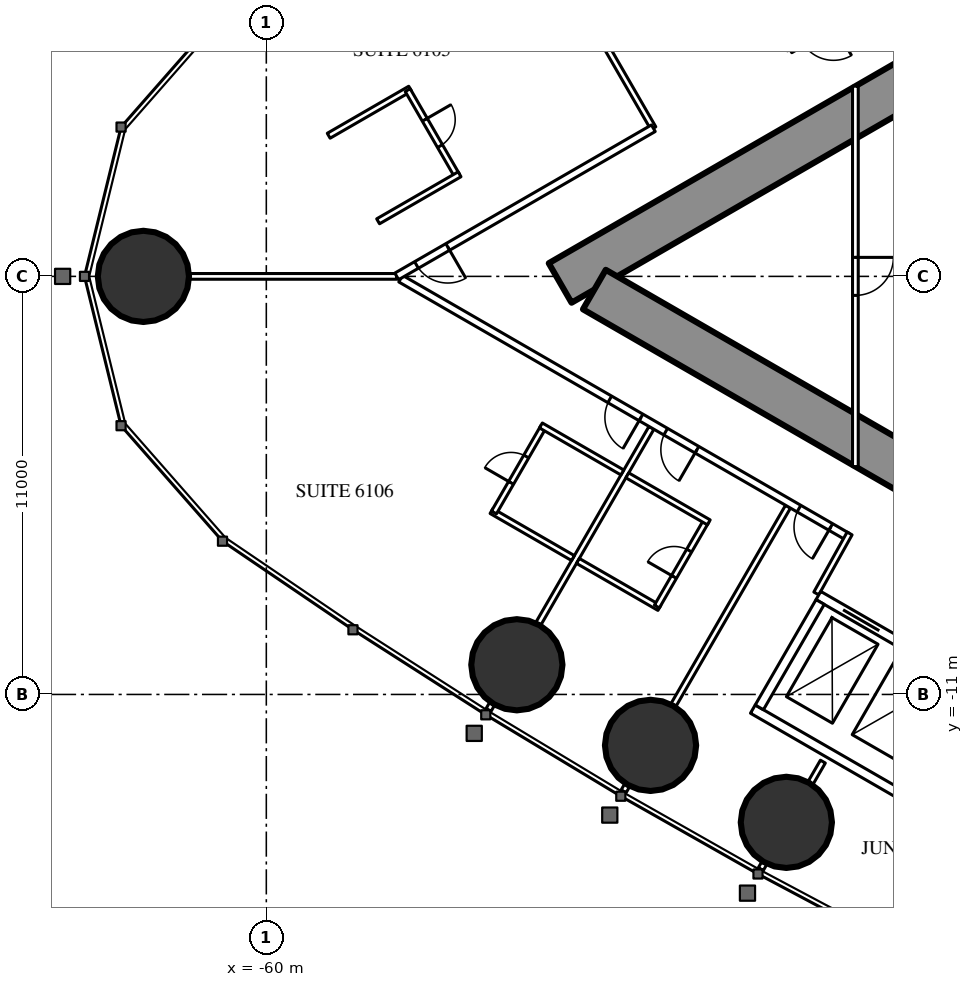
"""IFC4 building model, lengths in metres.
Left out: names, types, materials, properties, quantities, classifications, styles, units other than length and angle.
Written with IfcOpenShell. Run it as: python <this file> out.ifc"""

import sys

from ifc_helpers import new_model, si_unit, direction, frame, frame_2d, origin, origin_2d, place, context, subcontext, project, spatial, rectangle, circle, extrude, element, fill, save


model = new_model("IFC4")
c1 = context("Model", 3, precision=1e-05, world=origin(), true_north=direction((0.0, 1.0)))
c2 = subcontext(c1, "Body", "Model", "MODEL_VIEW")
j1 = project(units=[si_unit("LENGTHUNIT", "METRE"), si_unit("PLANEANGLEUNIT", "RADIAN")], contexts=[c1])
p1 = place(None, origin())
s1 = spatial("IfcSite", under=j1, at=p1, CompositionType="ELEMENT")
p2 = place(p1, origin())
s2 = spatial("IfcBuilding", under=s1, at=p2, CompositionType="ELEMENT")
p3 = place(p2, frame((0.0, 0.0, 229.7)))
s3 = spatial("IfcBuildingStorey", under=s2, at=p3, CompositionType="ELEMENT", Elevation=229.7)
for number, where, z_axis, x_axis in (
    (1, (-63.234, 0.0, 0.0), (0.0, 0.0, 1.0), (1.0, 0.0, 0.0)),
    (2, (-53.408, -10.219, 0.0), (0.0, 0.0, 1.0), (1.0, 0.0, 0.0)),
    (3, (-49.89, -12.34, 0.0), (0.0, 0.0, 1.0), (1.0, 0.0, 0.0)),
    (4, (-46.317, -14.365, 0.0), (0.0, 0.0, 1.0), (1.0, 0.0, 0.0)),
):
    element("IfcColumn", number, at=place(p3, frame(where, z_axis=z_axis, x_axis=x_axis)), inside=s3, PredefinedType="COLUMN", context=c2, shape_type="SweptSolid", body=[
        extrude(circle(Radius=1.2, at=origin_2d()), origin(), (0.0, 0.0, 1.0), 3.6),
    ])
p4 = place(p3, frame((-27.2, 14.3, 0.0), z_axis=(0.0, 0.0, 1.0), x_axis=(-0.866026593062, -0.499997940104, 0.0)))
e5 = element("IfcWall", 5, at=p4, inside=s3, PredefinedType="SHEAR", context=c2, shape_type="SweptSolid", body=[
    extrude(rectangle(XDim=28.946, YDim=1.2, at=frame_2d((14.473, 0.0))), origin(), (0.0, 0.0, 1.0), 3.6),
])
p5 = place(p4, frame((4.6, 0.0, 0.0)))
e6 = element("IfcOpeningElement", 6, at=p5, cuts=e5, PredefinedType="OPENING", context=c2, shape_type="SweptSolid", body=[
    extrude(rectangle(XDim=1.0, YDim=2.2, at=frame_2d((0.5, 1.1))), frame((0.0, 0.61, 0.0), z_axis=(0.0, -1.0, 0.0), x_axis=(1.0, 0.0, 0.0)), (0.0, 0.0, 1.0), 1.22),
])
p6 = place(p4, frame((13.395, 0.0, 0.0)))
e7 = element("IfcOpeningElement", 7, at=p6, cuts=e5, PredefinedType="OPENING", context=c2, shape_type="SweptSolid", body=[
    extrude(rectangle(XDim=1.8, YDim=2.2, at=frame_2d((0.9, 1.1))), frame((0.0, 0.61, 0.0), z_axis=(0.0, -1.0, 0.0), x_axis=(1.0, 0.0, 0.0)), (0.0, 0.0, 1.0), 1.22),
])
p7 = place(p3, frame((-27.2, -14.3, 0.0), z_axis=(0.0, 0.0, 1.0), x_axis=(-0.866024021859, 0.500002393557, 0.0)))
e8 = element("IfcWall", 8, at=p7, inside=s3, PredefinedType="SHEAR", context=c2, shape_type="SweptSolid", body=[
    extrude(rectangle(XDim=27.907, YDim=1.2, at=frame_2d((13.954, 0.0))), origin(), (0.0, 0.0, 1.0), 3.6),
])
p8 = place(p7, frame((4.6, 0.0, 0.0)))
e9 = element("IfcOpeningElement", 9, at=p8, cuts=e8, PredefinedType="OPENING", context=c2, shape_type="SweptSolid", body=[
    extrude(rectangle(XDim=1.0, YDim=2.2, at=frame_2d((0.5, 1.1))), frame((0.0, 0.61, 0.0), z_axis=(0.0, -1.0, 0.0), x_axis=(1.0, 0.0, 0.0)), (0.0, 0.0, 1.0), 1.22),
])
p9 = place(p7, frame((13.395, 0.0, 0.0)))
e10 = element("IfcOpeningElement", 10, at=p9, cuts=e8, PredefinedType="OPENING", context=c2, shape_type="SweptSolid", body=[
    extrude(rectangle(XDim=1.8, YDim=2.2, at=frame_2d((0.9, 1.1))), frame((0.0, 0.61, 0.0), z_axis=(0.0, -1.0, 0.0), x_axis=(1.0, 0.0, 0.0)), (0.0, 0.0, 1.0), 1.22),
])
p10 = place(p3, frame((-49.816, 3.898, 0.0), z_axis=(0.0, 0.0, 1.0), x_axis=(-0.500001913541, 0.866024298998, 0.0)))
e11 = element("IfcWall", 11, at=p10, inside=s3, PredefinedType="PARTITIONING", context=c2, shape_type="SweptSolid", body=[
    extrude(rectangle(XDim=6.05, YDim=0.15, at=frame_2d((3.025, 0.0))), origin(), (0.0, 0.0, 1.0), 2.45),
])
p11 = place(p3, frame((-46.898, -15.439, 0.0), z_axis=(0.0, 0.0, 1.0), x_axis=(-0.500232303069, -0.865891241997, 0.0)))
e12 = element("IfcWall", 12, at=p11, inside=s3, PredefinedType="PARTITIONING", context=c2, shape_type="SweptSolid", body=[
    extrude(rectangle(XDim=0.18, YDim=0.15, at=frame_2d((0.09, 0.0))), origin(), (0.0, 0.0, 1.0), 2.45),
])
p12 = place(p3, frame((-46.274, -6.059, 0.0), z_axis=(0.0, 0.0, 1.0), x_axis=(-0.500020471368, -0.866013584312, 0.0)))
e13 = element("IfcWall", 13, at=p12, inside=s3, PredefinedType="PARTITIONING", context=c2, shape_type="SweptSolid", body=[
    extrude(rectangle(XDim=6.028, YDim=0.15, at=frame_2d((3.014, 0.0))), origin(), (0.0, 0.0, 1.0), 2.45),
])
p13 = place(p3, frame((-50.508, -13.392, 0.0), z_axis=(0.0, 0.0, 1.0), x_axis=(-0.499644091975, -0.866230789891, 0.0)))
e14 = element("IfcWall", 14, at=p13, inside=s3, PredefinedType="PARTITIONING", context=c2, shape_type="SweptSolid", body=[
    extrude(rectangle(XDim=0.18, YDim=0.15, at=frame_2d((0.09, 0.0))), origin(), (0.0, 0.0, 1.0), 2.45),
])
p14 = place(p3, frame((-49.866, -3.985, 0.0), z_axis=(0.0, 0.0, 1.0), x_axis=(-0.500000694566, -0.866025002776, 0.0)))
e15 = element("IfcWall", 15, at=p14, inside=s3, PredefinedType="PARTITIONING", context=c2, shape_type="SweptSolid", body=[
    extrude(rectangle(XDim=5.95, YDim=0.15, at=frame_2d((2.975, 0.0))), origin(), (0.0, 0.0, 1.0), 2.45),
])
p15 = place(p3, frame((-54.061, -11.25, 0.0), z_axis=(0.0, 0.0, 1.0), x_axis=(-0.500391173478, -0.865799441849, 0.0)))
e16 = element("IfcWall", 16, at=p15, inside=s3, PredefinedType="PARTITIONING", context=c2, shape_type="SweptSolid", body=[
    extrude(rectangle(XDim=0.179, YDim=0.15, at=frame_2d((0.089, 0.0))), origin(), (0.0, 0.0, 1.0), 2.45),
])
p16 = place(p3, frame((-56.568, 0.0, 0.0), z_axis=(0.0, 0.0, 1.0), x_axis=(-1.0, 0.0, 0.0)))
e17 = element("IfcWall", 17, at=p16, inside=s3, PredefinedType="PARTITIONING", context=c2, shape_type="SweptSolid", body=[
    extrude(rectangle(XDim=5.446, YDim=0.15, at=frame_2d((2.723, 0.0))), origin(), (0.0, 0.0, 1.0), 2.45),
])
p17 = place(p3, frame((-45.356, -12.767, 0.0), z_axis=(0.0, 0.0, 1.0), x_axis=(-0.499886366516, -0.866091000168, 0.0)))
e18 = element("IfcWall", 18, at=p17, inside=s3, PredefinedType="PARTITIONING", context=c2, shape_type="SweptSolid", body=[
    extrude(rectangle(XDim=0.645, YDim=0.15, at=frame_2d((0.322, 0.0))), origin(), (0.0, 0.0, 1.0), 3.35),
])
p18 = place(p3, frame((-44.715, -6.844, 0.0), z_axis=(0.0, 0.0, 1.0), x_axis=(-0.866025261224, 0.500000246922, 0.0)))
e19 = element("IfcWall", 19, at=p18, inside=s3, PredefinedType="PARTITIONING", context=c2, shape_type="SweptSolid", body=[
    extrude(rectangle(XDim=13.567, YDim=0.2, at=frame_2d((6.783, 0.0))), origin(), (0.0, 0.0, 1.0), 3.35),
])
p19 = place(p18, frame((6.266, 0.0, 0.0)))
e20 = element("IfcOpeningElement", 20, at=p19, cuts=e19, PredefinedType="OPENING", context=c2, shape_type="SweptSolid", body=[
    extrude(rectangle(XDim=0.95, YDim=2.2, at=frame_2d((0.475, 1.1))), frame((0.0, 0.11, 0.0), z_axis=(0.0, -1.0, 0.0), x_axis=(1.0, 0.0, 0.0)), (0.0, 0.0, 1.0), 0.22),
])
p20 = place(p18, frame((4.565, 0.0, 0.0)))
e21 = element("IfcOpeningElement", 21, at=p20, cuts=e19, PredefinedType="OPENING", context=c2, shape_type="SweptSolid", body=[
    extrude(rectangle(XDim=0.95, YDim=2.2, at=frame_2d((0.475, 1.1))), frame((0.0, 0.11, 0.0), z_axis=(0.0, -1.0, 0.0), x_axis=(1.0, 0.0, 0.0)), (0.0, 0.0, 1.0), 0.22),
])
p21 = place(p18, frame((0.5, 0.0, 0.0)))
e22 = element("IfcOpeningElement", 22, at=p21, cuts=e19, PredefinedType="OPENING", context=c2, shape_type="SweptSolid", body=[
    extrude(rectangle(XDim=0.967, YDim=2.2, at=frame_2d((0.483, 1.1))), frame((0.0, 0.11, 0.0), z_axis=(0.0, -1.0, 0.0), x_axis=(1.0, 0.0, 0.0)), (0.0, 0.0, 1.0), 0.22),
])
p22 = place(p3, frame((-44.652, -6.764, 0.0), z_axis=(0.0, 0.0, 1.0), x_axis=(-0.485424724123, -0.874278466629, 0.0)))
e23 = element("IfcWall", 23, at=p22, inside=s3, PredefinedType="PARTITIONING", context=c2, shape_type="SweptSolid", body=[
    extrude(rectangle(XDim=1.805, YDim=0.15, at=frame_2d((0.903, 0.0))), origin(), (0.0, 0.0, 1.0), 3.35),
])
p23 = place(p3, frame((-56.215, 4.938, 0.0), z_axis=(0.0, 0.0, 1.0), x_axis=(-0.866006523861, -0.500032699561, 0.0)))
e24 = element("IfcWall", 24, at=p23, inside=s3, PredefinedType="PARTITIONING", context=c2, shape_type="SweptSolid", body=[
    extrude(rectangle(XDim=2.475, YDim=0.15, at=frame_2d((1.237, 0.0))), origin(), (0.0, 0.0, 1.0), 3.35),
])
p24 = place(p3, frame((-54.98, 2.649, 0.0), z_axis=(0.0, 0.0, 1.0), x_axis=(-0.500006934395, 0.866021400173, 0.0)))
e25 = element("IfcWall", 25, at=p24, inside=s3, PredefinedType="PARTITIONING", context=c2, shape_type="SweptSolid", body=[
    extrude(rectangle(XDim=2.6, YDim=0.15, at=frame_2d((1.3, 0.0))), origin(), (0.0, 0.0, 1.0), 3.35),
])
p25 = place(p24, frame((0.9, 0.0, 0.0)))
e26 = element("IfcOpeningElement", 26, at=p25, cuts=e25, PredefinedType="OPENING", context=c2, shape_type="SweptSolid", body=[
    extrude(rectangle(XDim=0.8, YDim=2.2, at=frame_2d((0.4, 1.1))), frame((0.0, 0.085, 0.0), z_axis=(0.0, -1.0, 0.0), x_axis=(1.0, 0.0, 0.0)), (0.0, 0.0, 1.0), 0.17),
])
for number, where, z_axis, x_axis in (
    (27, (-54.915, 2.687, 0.0), (0.0, 0.0, 1.0), (-0.866, -0.5, 0.0)),
    (28, (-51.931, -7.411, 0.0), (0.0, 0.0, 1.0), (-0.866, 0.5, 0.0)),
):
    element("IfcWall", number, at=place(p3, frame(where, z_axis=z_axis, x_axis=x_axis)), inside=s3, PredefinedType="PARTITIONING", context=c2, shape_type="SweptSolid", body=[
        extrude(rectangle(XDim=2.475, YDim=0.15, at=frame_2d((1.237, 0.0))), origin(), (0.0, 0.0, 1.0), 3.35),
    ])
p26 = place(p3, frame((-52.71, -3.96, 0.0), z_axis=(0.0, 0.0, 1.0), x_axis=(-0.500006934395, -0.866021400173, 0.0)))
e29 = element("IfcWall", 29, at=p26, inside=s3, PredefinedType="PARTITIONING", context=c2, shape_type="SweptSolid", body=[
    extrude(rectangle(XDim=2.6, YDim=0.15, at=frame_2d((1.3, 0.0))), origin(), (0.0, 0.0, 1.0), 3.35),
])
p27 = place(p26, frame((0.9, 0.0, 0.0)))
e30 = element("IfcOpeningElement", 30, at=p27, cuts=e29, PredefinedType="OPENING", context=c2, shape_type="SweptSolid", body=[
    extrude(rectangle(XDim=0.8, YDim=2.2, at=frame_2d((0.4, 1.1))), frame((0.0, 0.085, 0.0), z_axis=(0.0, -1.0, 0.0), x_axis=(1.0, 0.0, 0.0)), (0.0, 0.0, 1.0), 0.17),
])
p28 = place(p3, frame((-50.631, -5.16, 0.0), z_axis=(0.0, 0.0, 1.0), x_axis=(-0.86604923931, 0.499958713387, 0.0)))
e31 = element("IfcWall", 31, at=p28, inside=s3, PredefinedType="PARTITIONING", context=c2, shape_type="SweptSolid", body=[
    extrude(rectangle(XDim=2.475, YDim=0.15, at=frame_2d((1.237, 0.0))), origin(), (0.0, 0.0, 1.0), 2.5),
])
p29 = place(p3, frame((-49.658, -8.724, 0.0), z_axis=(0.0, 0.0, 1.0), x_axis=(-0.866031185235, 0.4999899861, 0.0)))
e32 = element("IfcWall", 32, at=p29, inside=s3, PredefinedType="PARTITIONING", context=c2, shape_type="SweptSolid", body=[
    extrude(rectangle(XDim=2.475, YDim=0.15, at=frame_2d((1.238, 0.0))), origin(), (0.0, 0.0, 1.0), 3.35),
])
p30 = place(p3, frame((-48.423, -6.435, 0.0), z_axis=(0.0, 0.0, 1.0), x_axis=(-0.500006934395, -0.866021400173, 0.0)))
e33 = element("IfcWall", 33, at=p30, inside=s3, PredefinedType="PARTITIONING", context=c2, shape_type="SweptSolid", body=[
    extrude(rectangle(XDim=2.6, YDim=0.15, at=frame_2d((1.3, 0.0))), origin(), (0.0, 0.0, 1.0), 3.35),
])
p31 = place(p30, frame((0.9, 0.0, 0.0)))
e34 = element("IfcOpeningElement", 34, at=p31, cuts=e33, PredefinedType="OPENING", context=c2, shape_type="SweptSolid", body=[
    extrude(rectangle(XDim=0.8, YDim=2.2, at=frame_2d((0.4, 1.1))), frame((0.0, 0.085, 0.0), z_axis=(0.0, -1.0, 0.0), x_axis=(1.0, 0.0, 0.0)), (0.0, 0.0, 1.0), 0.17),
])
p32 = place(p3, frame((-48.358, -6.472, 0.0), z_axis=(0.0, 0.0, 1.0), x_axis=(-0.866073894602, 0.499916002032, 0.0)))
e35 = element("IfcWall", 35, at=p32, inside=s3, PredefinedType="PARTITIONING", context=c2, shape_type="SweptSolid", body=[
    extrude(rectangle(XDim=2.475, YDim=0.15, at=frame_2d((1.238, 0.0))), origin(), (0.0, 0.0, 1.0), 2.5),
])
p33 = place(p3, frame((-28.737, 16.068, 0.0), z_axis=(0.0, 0.0, 1.0), x_axis=(-0.866023901326, -0.500002602325, 0.0)))
e36 = element("IfcWall", 36, at=p33, inside=s3, PredefinedType="PARTITIONING", context=c2, shape_type="SweptSolid", body=[
    extrude(rectangle(XDim=20.192, YDim=0.2, at=frame_2d((10.096, 0.0))), origin(), (0.0, 0.0, 1.0), 3.35),
])
p34 = place(p33, frame((1.08, 0.0, 0.0)))
e37 = element("IfcOpeningElement", 37, at=p34, cuts=e36, PredefinedType="OPENING", context=c2, shape_type="SweptSolid", body=[
    extrude(rectangle(XDim=1.8, YDim=2.04, at=frame_2d((0.9, 1.02))), frame((0.0, 0.11, 0.0), z_axis=(0.0, -1.0, 0.0), x_axis=(1.0, 0.0, 0.0)), (0.0, 0.0, 1.0), 0.22),
])
p35 = place(p33, frame((6.86, 0.0, 0.0)))
e38 = element("IfcOpeningElement", 38, at=p35, cuts=e36, PredefinedType="OPENING", context=c2, shape_type="SweptSolid", body=[
    extrude(rectangle(XDim=1.0, YDim=2.2, at=frame_2d((0.5, 1.1))), frame((0.0, 0.11, 0.0), z_axis=(0.0, -1.0, 0.0), x_axis=(1.0, 0.0, 0.0)), (0.0, 0.0, 1.0), 0.22),
])
p36 = place(p33, frame((18.867, 0.0, 0.0)))
e39 = element("IfcOpeningElement", 39, at=p36, cuts=e36, PredefinedType="OPENING", context=c2, shape_type="SweptSolid", body=[
    extrude(rectangle(XDim=0.95, YDim=2.2, at=frame_2d((0.475, 1.1))), frame((0.0, 0.11, 0.0), z_axis=(0.0, -1.0, 0.0), x_axis=(1.0, 0.0, 0.0)), (0.0, 0.0, 1.0), 0.22),
])
p37 = place(p3, frame((-49.816, 3.898, 0.0), z_axis=(0.0, 0.0, 1.0), x_axis=(-0.866028102716, -0.499995325284, 0.0)))
e40 = element("IfcWall", 40, at=p37, inside=s3, PredefinedType="PARTITIONING", context=c2, shape_type="SweptSolid", body=[
    extrude(rectangle(XDim=7.796, YDim=0.2, at=frame_2d((3.898, 0.0))), origin(), (0.0, 0.0, 1.0), 3.35),
])
p38 = place(p37, frame((6.246, 0.0, 0.0)))
e41 = element("IfcOpeningElement", 41, at=p38, cuts=e40, PredefinedType="OPENING", context=c2, shape_type="SweptSolid", body=[
    extrude(rectangle(XDim=0.95, YDim=2.2, at=frame_2d((0.475, 1.1))), frame((0.0, 0.11, 0.0), z_axis=(0.0, -1.0, 0.0), x_axis=(1.0, 0.0, 0.0)), (0.0, 0.0, 1.0), 0.22),
])
p39 = place(p3, frame((-44.5, 5.005, 0.0), z_axis=(0.0, 0.0, 1.0), x_axis=(0.0, -1.0, 0.0)))
e42 = element("IfcWall", 42, at=p39, inside=s3, PredefinedType="PARTITIONING", context=c2, shape_type="SweptSolid", body=[
    extrude(rectangle(XDim=10.009, YDim=0.15, at=frame_2d((5.005, 0.0))), origin(), (0.0, 0.0, 1.0), 2.5),
])
p40 = place(p39, frame((4.505, 0.0, 0.0)))
e43 = element("IfcOpeningElement", 43, at=p40, cuts=e42, PredefinedType="OPENING", context=c2, shape_type="SweptSolid", body=[
    extrude(rectangle(XDim=1.0, YDim=2.2, at=frame_2d((0.5, 1.1))), frame((0.0, 0.085, 0.0), z_axis=(0.0, -1.0, 0.0), x_axis=(1.0, 0.0, 0.0)), (0.0, 0.0, 1.0), 0.17),
])
p41 = place(p3, frame((-39.758, -11.697, 0.0), z_axis=(0.0, 0.0, 1.0), x_axis=(-0.866024194504, 0.500002094529, 0.0)))
e44 = element("IfcWall", 44, at=p41, inside=s3, PredefinedType="PARTITIONING", context=c2, shape_type="SweptSolid", body=[
    extrude(rectangle(XDim=6.6, YDim=0.25, at=frame_2d((3.3, 0.0))), origin(), (0.0, 0.0, 1.0), 3.35),
])
p42 = place(p41, frame((0.75, 0.0, 0.0)))
e45 = element("IfcOpeningElement", 45, at=p42, cuts=e44, PredefinedType="OPENING", context=c2, shape_type="SweptSolid", body=[
    extrude(rectangle(XDim=1.1, YDim=2.2, at=frame_2d((0.55, 1.1))), frame((0.0, 0.135, 0.0), z_axis=(0.0, -1.0, 0.0), x_axis=(1.0, 0.0, 0.0)), (0.0, 0.0, 1.0), 0.27),
])
p43 = place(p41, frame((2.75, 0.0, 0.0)))
e46 = element("IfcOpeningElement", 46, at=p43, cuts=e44, PredefinedType="OPENING", context=c2, shape_type="SweptSolid", body=[
    extrude(rectangle(XDim=1.1, YDim=2.2, at=frame_2d((0.55, 1.1))), frame((0.0, 0.135, 0.0), z_axis=(0.0, -1.0, 0.0), x_axis=(1.0, 0.0, 0.0)), (0.0, 0.0, 1.0), 0.27),
])
p44 = place(p41, frame((4.75, 0.0, 0.0)))
e47 = element("IfcOpeningElement", 47, at=p44, cuts=e44, PredefinedType="OPENING", context=c2, shape_type="SweptSolid", body=[
    extrude(rectangle(XDim=1.1, YDim=2.2, at=frame_2d((0.55, 1.1))), frame((0.0, 0.135, 0.0), z_axis=(0.0, -1.0, 0.0), x_axis=(1.0, 0.0, 0.0)), (0.0, 0.0, 1.0), 0.27),
])
p45 = place(p3, frame((-41.482, -14.686, 0.0), z_axis=(0.0, 0.0, 1.0), x_axis=(-0.86603344179, 0.499986077507, 0.0)))
e48 = element("IfcWall", 48, at=p45, inside=s3, PredefinedType="PARTITIONING", context=c2, shape_type="SweptSolid", body=[
    extrude(rectangle(XDim=6.6, YDim=0.25, at=frame_2d((3.3, 0.0))), origin(), (0.0, 0.0, 1.0), 3.35),
])
p46 = place(p3, frame((-45.428, -8.568, 0.0), z_axis=(0.0, 0.0, 1.0), x_axis=(-0.499929347863, -0.866066190972, 0.0)))
e49 = element("IfcWall", 49, at=p46, inside=s3, PredefinedType="PARTITIONING", context=c2, shape_type="SweptSolid", body=[
    extrude(rectangle(XDim=3.201, YDim=0.25, at=frame_2d((1.6, 0.0))), origin(), (0.0, 0.0, 1.0), 3.35),
])
p47 = place(p25, origin())
e50 = element("IfcDoor", 50, at=p47, inside=s3, OperationType="SINGLE_SWING_RIGHT", PredefinedType="DOOR", context=c2, shape_type="SweptSolid", body=[
    extrude(rectangle(XDim=0.8, YDim=2.2, at=frame_2d((0.4, 1.1))), frame((0.0, 0.025, 0.0), z_axis=(0.0, -1.0, 0.0), x_axis=(1.0, 0.0, 0.0)), (0.0, 0.0, 1.0), 0.05),
])
fill(e26, e50)
p48 = place(p38, origin())
e51 = element("IfcDoor", 51, at=p48, inside=s3, OperationType="SINGLE_SWING_LEFT", PredefinedType="DOOR", context=c2, shape_type="SweptSolid", body=[
    extrude(rectangle(XDim=0.95, YDim=2.2, at=frame_2d((0.475, 1.1))), frame((0.0, 0.025, 0.0), z_axis=(0.0, -1.0, 0.0), x_axis=(1.0, 0.0, 0.0)), (0.0, 0.0, 1.0), 0.05),
])
fill(e41, e51)
p49 = place(p27, origin())
e52 = element("IfcDoor", 52, at=p49, inside=s3, OperationType="SINGLE_SWING_RIGHT", PredefinedType="DOOR", context=c2, shape_type="SweptSolid", body=[
    extrude(rectangle(XDim=0.8, YDim=2.2, at=frame_2d((0.4, 1.1))), frame((0.0, 0.025, 0.0), z_axis=(0.0, -1.0, 0.0), x_axis=(1.0, 0.0, 0.0)), (0.0, 0.0, 1.0), 0.05),
])
fill(e30, e52)
p50 = place(p19, origin())
e53 = element("IfcDoor", 53, at=p50, inside=s3, OperationType="SINGLE_SWING_LEFT", PredefinedType="DOOR", context=c2, shape_type="SweptSolid", body=[
    extrude(rectangle(XDim=0.95, YDim=2.2, at=frame_2d((0.475, 1.1))), frame((0.0, 0.025, 0.0), z_axis=(0.0, -1.0, 0.0), x_axis=(1.0, 0.0, 0.0)), (0.0, 0.0, 1.0), 0.05),
])
fill(e20, e53)
p51 = place(p31, origin())
e54 = element("IfcDoor", 54, at=p51, inside=s3, OperationType="SINGLE_SWING_RIGHT", PredefinedType="DOOR", context=c2, shape_type="SweptSolid", body=[
    extrude(rectangle(XDim=0.8, YDim=2.2, at=frame_2d((0.4, 1.1))), frame((0.0, 0.025, 0.0), z_axis=(0.0, -1.0, 0.0), x_axis=(1.0, 0.0, 0.0)), (0.0, 0.0, 1.0), 0.05),
])
fill(e34, e54)
p52 = place(p20, origin())
e55 = element("IfcDoor", 55, at=p52, inside=s3, OperationType="SINGLE_SWING_LEFT", PredefinedType="DOOR", context=c2, shape_type="SweptSolid", body=[
    extrude(rectangle(XDim=0.95, YDim=2.2, at=frame_2d((0.475, 1.1))), frame((0.0, 0.025, 0.0), z_axis=(0.0, -1.0, 0.0), x_axis=(1.0, 0.0, 0.0)), (0.0, 0.0, 1.0), 0.05),
])
fill(e21, e55)
p53 = place(p21, origin())
e56 = element("IfcDoor", 56, at=p53, inside=s3, OperationType="SINGLE_SWING_LEFT", PredefinedType="DOOR", context=c2, shape_type="SweptSolid", body=[
    extrude(rectangle(XDim=0.967, YDim=2.2, at=frame_2d((0.483, 1.1))), frame((0.0, 0.025, 0.0), z_axis=(0.0, -1.0, 0.0), x_axis=(1.0, 0.0, 0.0)), (0.0, 0.0, 1.0), 0.05),
])
fill(e22, e56)
p54 = place(p40, origin())
e57 = element("IfcDoor", 57, at=p54, inside=s3, OperationType="SINGLE_SWING_LEFT", PredefinedType="DOOR", context=c2, shape_type="SweptSolid", body=[
    extrude(rectangle(XDim=1.0, YDim=2.2, at=frame_2d((0.5, 1.1))), frame((0.0, 0.025, 0.0), z_axis=(0.0, -1.0, 0.0), x_axis=(1.0, 0.0, 0.0)), (0.0, 0.0, 1.0), 0.05),
])
fill(e43, e57)
p55 = place(p44, origin())
e58 = element("IfcDoor", 58, at=p55, inside=s3, OperationType="DOUBLE_DOOR_SLIDING", PredefinedType="USERDEFINED", context=c2, shape_type="SweptSolid", body=[
    extrude(rectangle(XDim=1.1, YDim=2.2, at=frame_2d((0.55, 1.1))), frame((0.0, 0.025, 0.0), z_axis=(0.0, -1.0, 0.0), x_axis=(1.0, 0.0, 0.0)), (0.0, 0.0, 1.0), 0.05),
])
fill(e47, e58)
save(model, sys.argv[1])
